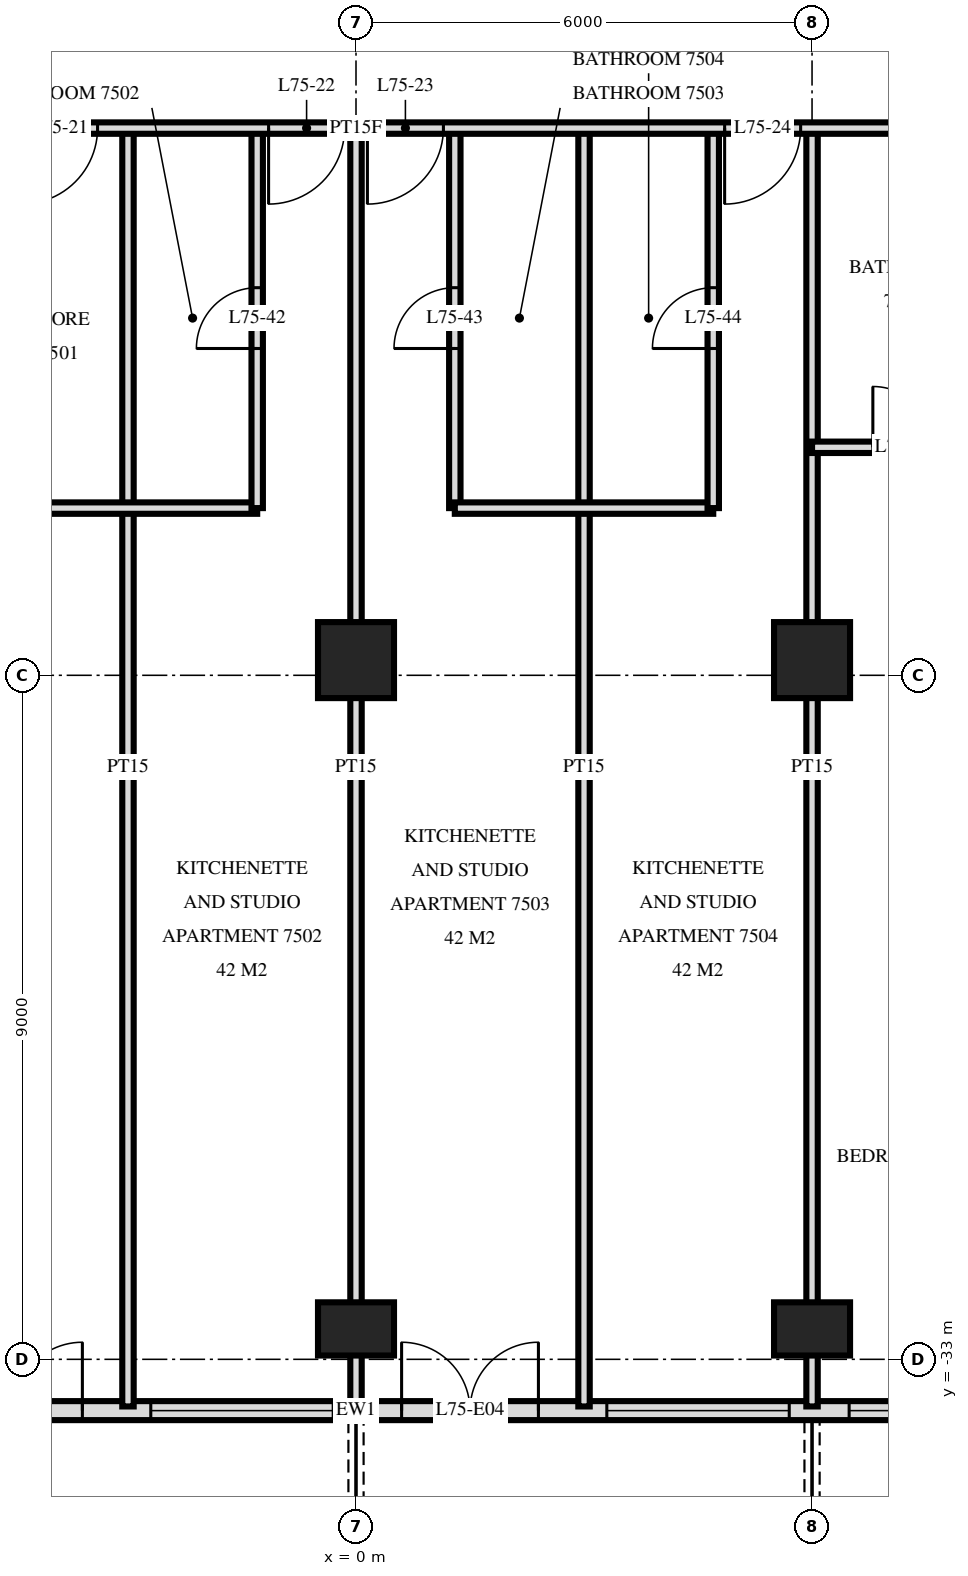
"""IFC4 building model, lengths in metres.
Left out: names, types, materials, properties, quantities, classifications, styles, units other than length and angle.
Written with IfcOpenShell. Run it as: python <this file> out.ifc"""

import sys

from ifc_helpers import new_model, si_unit, direction, frame, frame_2d, origin, origin_2d, place, context, subcontext, project, spatial, rectangle, extrude, element, fill, save


model = new_model("IFC4")
c1 = context("Model", 3, precision=1e-05, world=origin(), true_north=direction((0.0, 1.0)))
c2 = subcontext(c1, "Body", "Model", "MODEL_VIEW")
j1 = project(units=[si_unit("LENGTHUNIT", "METRE"), si_unit("PLANEANGLEUNIT", "RADIAN")], contexts=[c1])
p1 = place(None, origin())
s1 = spatial("IfcSite", under=j1, at=p1, CompositionType="ELEMENT")
p2 = place(p1, origin())
s2 = spatial("IfcBuilding", under=s1, at=p2, CompositionType="ELEMENT")
p3 = place(p2, frame((0.0, 0.0, 284.1)))
s3 = spatial("IfcBuildingStorey", under=s2, at=p3, CompositionType="ELEMENT", Elevation=284.1)
p4 = place(p3, frame((0.0, -32.6, 0.0), z_axis=(0.0, 0.0, 1.0), x_axis=(1.0, 0.0, 0.0)))
e1 = element("IfcColumn", 1, at=p4, inside=s3, PredefinedType="COLUMN", context=c2, shape_type="SweptSolid", body=[
    extrude(rectangle(XDim=1.0, YDim=0.7, at=origin_2d()), origin(), (0.0, 0.0, 1.0), 3.5),
])
p5 = place(p3, frame((0.0, -23.8, 0.0), z_axis=(0.0, 0.0, 1.0), x_axis=(1.0, 0.0, 0.0)))
e2 = element("IfcColumn", 2, at=p5, inside=s3, PredefinedType="COLUMN", context=c2, shape_type="SweptSolid", body=[
    extrude(rectangle(XDim=1.0, YDim=1.0, at=origin_2d()), origin(), (0.0, 0.0, 1.0), 3.5),
])
p6 = place(p3, frame((6.0, -32.6, 0.0), z_axis=(0.0, 0.0, 1.0), x_axis=(1.0, 0.0, 0.0)))
e3 = element("IfcColumn", 3, at=p6, inside=s3, PredefinedType="COLUMN", context=c2, shape_type="SweptSolid", body=[
    extrude(rectangle(XDim=1.0, YDim=0.7, at=origin_2d()), origin(), (0.0, 0.0, 1.0), 3.5),
])
p7 = place(p3, frame((6.0, -23.8, 0.0), z_axis=(0.0, 0.0, 1.0), x_axis=(1.0, 0.0, 0.0)))
e4 = element("IfcColumn", 4, at=p7, inside=s3, PredefinedType="COLUMN", context=c2, shape_type="SweptSolid", body=[
    extrude(rectangle(XDim=1.0, YDim=1.0, at=origin_2d()), origin(), (0.0, 0.0, 1.0), 3.5),
])
p8 = place(p3, frame((-18.575, -33.675, 0.0), z_axis=(0.0, 0.0, 1.0), x_axis=(1.0, 0.0, 0.0)))
e5 = element("IfcWall", 5, at=p8, inside=s3, PredefinedType="SOLIDWALL", context=c2, shape_type="SweptSolid", body=[
    extrude(rectangle(XDim=37.151, YDim=0.25, at=frame_2d((18.575, 0.0))), origin(), (0.0, 0.0, 1.0), 3.22),
])
p9 = place(p8, frame((1.175, 0.0, 0.0)))
e6 = element("IfcOpeningElement", 6, at=p9, cuts=e5, PredefinedType="OPENING", context=c2, shape_type="SweptSolid", body=[
    extrude(rectangle(XDim=1.8, YDim=2.4, at=frame_2d((0.9, 1.2))), frame((0.0, 0.135, 0.0), z_axis=(0.0, -1.0, 0.0), x_axis=(1.0, 0.0, 0.0)), (0.0, 0.0, 1.0), 0.27),
])
p10 = place(p8, frame((4.4, 0.0, 0.9)))
e7 = element("IfcOpeningElement", 7, at=p10, cuts=e5, PredefinedType="OPENING", context=c2, shape_type="SweptSolid", body=[
    extrude(rectangle(XDim=1.8, YDim=1.5, at=frame_2d((0.9, 0.75))), frame((0.0, 0.135, 0.0), z_axis=(0.0, -1.0, 0.0), x_axis=(1.0, 0.0, 0.0)), (0.0, 0.0, 1.0), 0.27),
])
p11 = place(p8, frame((6.875, 0.0, 0.9)))
e8 = element("IfcOpeningElement", 8, at=p11, cuts=e5, PredefinedType="OPENING", context=c2, shape_type="SweptSolid", body=[
    extrude(rectangle(XDim=2.4, YDim=1.5, at=frame_2d((1.2, 0.75))), frame((0.0, 0.135, 0.0), z_axis=(0.0, -1.0, 0.0), x_axis=(1.0, 0.0, 0.0)), (0.0, 0.0, 1.0), 0.27),
])
p12 = place(p8, frame((10.175, 0.0, 0.0)))
e9 = element("IfcOpeningElement", 9, at=p12, cuts=e5, PredefinedType="OPENING", context=c2, shape_type="SweptSolid", body=[
    extrude(rectangle(XDim=1.8, YDim=2.4, at=frame_2d((0.9, 1.2))), frame((0.0, 0.135, 0.0), z_axis=(0.0, -1.0, 0.0), x_axis=(1.0, 0.0, 0.0)), (0.0, 0.0, 1.0), 0.27),
])
p13 = place(p8, frame((13.175, 0.0, 0.0)))
e10 = element("IfcOpeningElement", 10, at=p13, cuts=e5, PredefinedType="OPENING", context=c2, shape_type="SweptSolid", body=[
    extrude(rectangle(XDim=1.8, YDim=2.4, at=frame_2d((0.9, 1.2))), frame((0.0, 0.135, 0.0), z_axis=(0.0, -1.0, 0.0), x_axis=(1.0, 0.0, 0.0)), (0.0, 0.0, 1.0), 0.27),
])
p14 = place(p8, frame((15.875, 0.0, 0.9)))
e11 = element("IfcOpeningElement", 11, at=p14, cuts=e5, PredefinedType="OPENING", context=c2, shape_type="SweptSolid", body=[
    extrude(rectangle(XDim=2.4, YDim=1.5, at=frame_2d((1.2, 0.75))), frame((0.0, 0.135, 0.0), z_axis=(0.0, -1.0, 0.0), x_axis=(1.0, 0.0, 0.0)), (0.0, 0.0, 1.0), 0.27),
])
p15 = place(p8, frame((19.175, 0.0, 0.0)))
e12 = element("IfcOpeningElement", 12, at=p15, cuts=e5, PredefinedType="OPENING", context=c2, shape_type="SweptSolid", body=[
    extrude(rectangle(XDim=1.8, YDim=2.4, at=frame_2d((0.9, 1.2))), frame((0.0, 0.135, 0.0), z_axis=(0.0, -1.0, 0.0), x_axis=(1.0, 0.0, 0.0)), (0.0, 0.0, 1.0), 0.27),
])
p16 = place(p8, frame((21.875, 0.0, 0.9)))
e13 = element("IfcOpeningElement", 13, at=p16, cuts=e5, PredefinedType="OPENING", context=c2, shape_type="SweptSolid", body=[
    extrude(rectangle(XDim=2.4, YDim=1.5, at=frame_2d((1.2, 0.75))), frame((0.0, 0.135, 0.0), z_axis=(0.0, -1.0, 0.0), x_axis=(1.0, 0.0, 0.0)), (0.0, 0.0, 1.0), 0.27),
])
p17 = place(p8, frame((25.063, 0.0, 0.9)))
e14 = element("IfcOpeningElement", 14, at=p17, cuts=e5, PredefinedType="OPENING", context=c2, shape_type="SweptSolid", body=[
    extrude(rectangle(XDim=1.8, YDim=1.5, at=frame_2d((0.9, 0.75))), frame((0.0, 0.135, 0.0), z_axis=(0.0, -1.0, 0.0), x_axis=(1.0, 0.0, 0.0)), (0.0, 0.0, 1.0), 0.27),
])
p18 = place(p8, frame((27.838, 0.0, 0.0)))
e15 = element("IfcOpeningElement", 15, at=p18, cuts=e5, PredefinedType="OPENING", context=c2, shape_type="SweptSolid", body=[
    extrude(rectangle(XDim=1.8, YDim=2.4, at=frame_2d((0.9, 1.2))), frame((0.0, 0.135, 0.0), z_axis=(0.0, -1.0, 0.0), x_axis=(1.0, 0.0, 0.0)), (0.0, 0.0, 1.0), 0.27),
])
p19 = place(p8, frame((31.175, 0.0, 0.0)))
e16 = element("IfcOpeningElement", 16, at=p19, cuts=e5, PredefinedType="OPENING", context=c2, shape_type="SweptSolid", body=[
    extrude(rectangle(XDim=1.8, YDim=2.4, at=frame_2d((0.9, 1.2))), frame((0.0, 0.135, 0.0), z_axis=(0.0, -1.0, 0.0), x_axis=(1.0, 0.0, 0.0)), (0.0, 0.0, 1.0), 0.27),
])
p20 = place(p3, frame((6.0, -33.62, 0.0), z_axis=(0.0, 0.0, 1.0), x_axis=(0.0, 1.0, 0.0)))
e17 = element("IfcWall", 17, at=p20, inside=s3, PredefinedType="PARTITIONING", context=c2, shape_type="SweptSolid", body=[
    extrude(rectangle(XDim=16.82, YDim=0.15, at=frame_2d((8.41, 0.0))), origin(), (0.0, 0.0, 1.0), 3.22),
])
p21 = place(p3, frame((4.7, -21.8, 0.0), z_axis=(0.0, 0.0, 1.0), x_axis=(0.0, 1.0, 0.0)))
e18 = element("IfcWall", 18, at=p21, inside=s3, PredefinedType="PARTITIONING", context=c2, shape_type="SweptSolid", body=[
    extrude(rectangle(XDim=5.0, YDim=0.15, at=frame_2d((2.5, 0.0))), origin(), (0.0, 0.0, 1.0), 3.22),
])
p22 = place(p21, frame((2.1, 0.0, 0.0)))
e19 = element("IfcOpeningElement", 19, at=p22, cuts=e18, PredefinedType="OPENING", context=c2, shape_type="SweptSolid", body=[
    extrude(rectangle(XDim=0.8, YDim=2.1, at=frame_2d((0.4, 1.05))), frame((0.0, 0.085, 0.0), z_axis=(0.0, -1.0, 0.0), x_axis=(1.0, 0.0, 0.0)), (0.0, 0.0, 1.0), 0.17),
])
p23 = place(p3, frame((3.0, -33.62, 0.0), z_axis=(0.0, 0.0, 1.0), x_axis=(0.0, 1.0, 0.0)))
e20 = element("IfcWall", 20, at=p23, inside=s3, PredefinedType="PARTITIONING", context=c2, shape_type="SweptSolid", body=[
    extrude(rectangle(XDim=16.82, YDim=0.15, at=frame_2d((8.41, 0.0))), origin(), (0.0, 0.0, 1.0), 3.22),
])
p24 = place(p3, frame((1.3, -21.8, 0.0), z_axis=(0.0, 0.0, 1.0), x_axis=(0.0, 1.0, 0.0)))
e21 = element("IfcWall", 21, at=p24, inside=s3, PredefinedType="PARTITIONING", context=c2, shape_type="SweptSolid", body=[
    extrude(rectangle(XDim=5.0, YDim=0.15, at=frame_2d((2.5, 0.0))), origin(), (0.0, 0.0, 1.0), 3.22),
])
p25 = place(p24, frame((2.1, 0.0, 0.0)))
e22 = element("IfcOpeningElement", 22, at=p25, cuts=e21, PredefinedType="OPENING", context=c2, shape_type="SweptSolid", body=[
    extrude(rectangle(XDim=0.8, YDim=2.1, at=frame_2d((0.4, 1.05))), frame((0.0, 0.085, 0.0), z_axis=(0.0, -1.0, 0.0), x_axis=(1.0, 0.0, 0.0)), (0.0, 0.0, 1.0), 0.17),
])
p26 = place(p3, frame((0.0, -33.62, 0.0), z_axis=(0.0, 0.0, 1.0), x_axis=(0.0, 1.0, 0.0)))
e23 = element("IfcWall", 23, at=p26, inside=s3, PredefinedType="PARTITIONING", context=c2, shape_type="SweptSolid", body=[
    extrude(rectangle(XDim=16.82, YDim=0.15, at=frame_2d((8.41, 0.0))), origin(), (0.0, 0.0, 1.0), 3.22),
])
p27 = place(p3, frame((-1.3, -21.8, 0.0), z_axis=(0.0, 0.0, 1.0), x_axis=(0.0, 1.0, 0.0)))
e24 = element("IfcWall", 24, at=p27, inside=s3, PredefinedType="PARTITIONING", context=c2, shape_type="SweptSolid", body=[
    extrude(rectangle(XDim=5.0, YDim=0.15, at=frame_2d((2.5, 0.0))), origin(), (0.0, 0.0, 1.0), 3.22),
])
p28 = place(p27, frame((2.1, 0.0, 0.0)))
e25 = element("IfcOpeningElement", 25, at=p28, cuts=e24, PredefinedType="OPENING", context=c2, shape_type="SweptSolid", body=[
    extrude(rectangle(XDim=0.8, YDim=2.1, at=frame_2d((0.4, 1.05))), frame((0.0, 0.085, 0.0), z_axis=(0.0, -1.0, 0.0), x_axis=(1.0, 0.0, 0.0)), (0.0, 0.0, 1.0), 0.17),
])
p29 = place(p3, frame((-3.0, -33.62, 0.0), z_axis=(0.0, 0.0, 1.0), x_axis=(0.0, 1.0, 0.0)))
e26 = element("IfcWall", 26, at=p29, inside=s3, PredefinedType="PARTITIONING", context=c2, shape_type="SweptSolid", body=[
    extrude(rectangle(XDim=16.82, YDim=0.15, at=frame_2d((8.41, 0.0))), origin(), (0.0, 0.0, 1.0), 3.22),
])
p30 = place(p3, frame((-4.8, -21.8, 0.0), z_axis=(0.0, 0.0, 1.0), x_axis=(1.0, 0.0, 0.0)))
e27 = element("IfcWall", 27, at=p30, inside=s3, PredefinedType="PARTITIONING", context=c2, shape_type="SweptSolid", body=[
    extrude(rectangle(XDim=3.5, YDim=0.15, at=frame_2d((1.75, 0.0))), origin(), (0.0, 0.0, 1.0), 3.22),
])
p31 = place(p3, frame((1.3, -21.8, 0.0), z_axis=(0.0, 0.0, 1.0), x_axis=(1.0, 0.0, 0.0)))
e28 = element("IfcWall", 28, at=p31, inside=s3, PredefinedType="PARTITIONING", context=c2, shape_type="SweptSolid", body=[
    extrude(rectangle(XDim=3.4, YDim=0.15, at=frame_2d((1.7, 0.0))), origin(), (0.0, 0.0, 1.0), 3.22),
])
p32 = place(p3, frame((6.0, -21.0, 0.0), z_axis=(0.0, 0.0, 1.0), x_axis=(1.0, 0.0, 0.0)))
e29 = element("IfcWall", 29, at=p32, inside=s3, PredefinedType="PARTITIONING", context=c2, shape_type="SweptSolid", body=[
    extrude(rectangle(XDim=6.0, YDim=0.15, at=frame_2d((3.0, 0.0))), origin(), (0.0, 0.0, 1.0), 3.22),
])
p33 = place(p32, frame((0.8, 0.0, 0.0)))
e30 = element("IfcOpeningElement", 30, at=p33, cuts=e29, PredefinedType="OPENING", context=c2, shape_type="SweptSolid", body=[
    extrude(rectangle(XDim=0.8, YDim=2.1, at=frame_2d((0.4, 1.05))), frame((0.0, 0.085, 0.0), z_axis=(0.0, -1.0, 0.0), x_axis=(1.0, 0.0, 0.0)), (0.0, 0.0, 1.0), 0.17),
])
p34 = place(p3, frame((-22.92, -16.8, 0.0), z_axis=(0.0, 0.0, 1.0), x_axis=(1.0, 0.0, 0.0)))
e31 = element("IfcWall", 31, at=p34, inside=s3, PredefinedType="PARTITIONING", context=c2, shape_type="SweptSolid", body=[
    extrude(rectangle(XDim=45.84, YDim=0.15, at=frame_2d((22.92, 0.0))), origin(), (0.0, 0.0, 1.0), 3.22),
])
p35 = place(p34, frame((16.72, 0.0, 0.0)))
e32 = element("IfcOpeningElement", 32, at=p35, cuts=e31, PredefinedType="OPENING", context=c2, shape_type="SweptSolid", body=[
    extrude(rectangle(XDim=1.0, YDim=2.1, at=frame_2d((0.5, 1.05))), frame((0.0, 0.085, 0.0), z_axis=(0.0, -1.0, 0.0), x_axis=(1.0, 0.0, 0.0)), (0.0, 0.0, 1.0), 0.17),
])
p36 = place(p34, frame((18.52, 0.0, 0.0)))
e33 = element("IfcOpeningElement", 33, at=p36, cuts=e31, PredefinedType="OPENING", context=c2, shape_type="SweptSolid", body=[
    extrude(rectangle(XDim=1.0, YDim=2.1, at=frame_2d((0.5, 1.05))), frame((0.0, 0.085, 0.0), z_axis=(0.0, -1.0, 0.0), x_axis=(1.0, 0.0, 0.0)), (0.0, 0.0, 1.0), 0.17),
])
p37 = place(p34, frame((21.77, 0.0, 0.0)))
e34 = element("IfcOpeningElement", 34, at=p37, cuts=e31, PredefinedType="OPENING", context=c2, shape_type="SweptSolid", body=[
    extrude(rectangle(XDim=1.0, YDim=2.1, at=frame_2d((0.5, 1.05))), frame((0.0, 0.085, 0.0), z_axis=(0.0, -1.0, 0.0), x_axis=(1.0, 0.0, 0.0)), (0.0, 0.0, 1.0), 0.17),
])
p38 = place(p34, frame((23.07, 0.0, 0.0)))
e35 = element("IfcOpeningElement", 35, at=p38, cuts=e31, PredefinedType="OPENING", context=c2, shape_type="SweptSolid", body=[
    extrude(rectangle(XDim=1.0, YDim=2.1, at=frame_2d((0.5, 1.05))), frame((0.0, 0.085, 0.0), z_axis=(0.0, -1.0, 0.0), x_axis=(1.0, 0.0, 0.0)), (0.0, 0.0, 1.0), 0.17),
])
p39 = place(p34, frame((27.77, 0.0, 0.0)))
e36 = element("IfcOpeningElement", 36, at=p39, cuts=e31, PredefinedType="OPENING", context=c2, shape_type="SweptSolid", body=[
    extrude(rectangle(XDim=1.0, YDim=2.1, at=frame_2d((0.5, 1.05))), frame((0.0, 0.085, 0.0), z_axis=(0.0, -1.0, 0.0), x_axis=(1.0, 0.0, 0.0)), (0.0, 0.0, 1.0), 0.17),
])
p40 = place(p34, frame((7.02, 0.0, 0.0)))
e37 = element("IfcOpeningElement", 37, at=p40, cuts=e31, PredefinedType="OPENING", context=c2, shape_type="SweptSolid", body=[
    extrude(rectangle(XDim=1.0, YDim=2.1, at=frame_2d((0.5, 1.05))), frame((0.0, 0.085, 0.0), z_axis=(0.0, -1.0, 0.0), x_axis=(1.0, 0.0, 0.0)), (0.0, 0.0, 1.0), 0.17),
])
p41 = place(p34, frame((35.42, 0.0, 0.0)))
e38 = element("IfcOpeningElement", 38, at=p41, cuts=e31, PredefinedType="OPENING", context=c2, shape_type="SweptSolid", body=[
    extrude(rectangle(XDim=1.0, YDim=2.1, at=frame_2d((0.5, 1.05))), frame((0.0, 0.085, 0.0), z_axis=(0.0, -1.0, 0.0), x_axis=(1.0, 0.0, 0.0)), (0.0, 0.0, 1.0), 0.17),
])
p42 = place(p34, frame((42.19, 0.0, 0.0)))
e39 = element("IfcOpeningElement", 39, at=p42, cuts=e31, PredefinedType="OPENING", context=c2, shape_type="SweptSolid", body=[
    extrude(rectangle(XDim=1.0, YDim=2.1, at=frame_2d((0.5, 1.05))), frame((0.0, 0.085, 0.0), z_axis=(0.0, -1.0, 0.0), x_axis=(1.0, 0.0, 0.0)), (0.0, 0.0, 1.0), 0.17),
])
p43 = place(p13, origin())
e40 = element("IfcDoor", 40, at=p43, inside=s3, OperationType="DOUBLE_DOOR_SINGLE_SWING", PredefinedType="DOOR", context=c2, shape_type="SweptSolid", body=[
    extrude(rectangle(XDim=1.8, YDim=2.4, at=frame_2d((0.9, 1.2))), frame((0.0, 0.025, 0.0), z_axis=(0.0, -1.0, 0.0), x_axis=(1.0, 0.0, 0.0)), (0.0, 0.0, 1.0), 0.05),
])
fill(e10, e40)
p44 = place(p14, origin())
e41 = element("IfcWindow", 41, at=p44, inside=s3, PartitioningType="SINGLE_PANEL", PredefinedType="WINDOW", context=c2, shape_type="SweptSolid", body=[
    extrude(rectangle(XDim=2.4, YDim=1.5, at=frame_2d((1.2, 0.75))), frame((0.0, 0.03, 0.0), z_axis=(0.0, -1.0, 0.0), x_axis=(1.0, 0.0, 0.0)), (0.0, 0.0, 1.0), 0.06),
])
fill(e11, e41)
p45 = place(p15, origin())
e42 = element("IfcDoor", 42, at=p45, inside=s3, OperationType="DOUBLE_DOOR_SINGLE_SWING", PredefinedType="DOOR", context=c2, shape_type="SweptSolid", body=[
    extrude(rectangle(XDim=1.8, YDim=2.4, at=frame_2d((0.9, 1.2))), frame((0.0, 0.025, 0.0), z_axis=(0.0, -1.0, 0.0), x_axis=(1.0, 0.0, 0.0)), (0.0, 0.0, 1.0), 0.05),
])
fill(e12, e42)
p46 = place(p16, origin())
e43 = element("IfcWindow", 43, at=p46, inside=s3, PartitioningType="SINGLE_PANEL", PredefinedType="WINDOW", context=c2, shape_type="SweptSolid", body=[
    extrude(rectangle(XDim=2.4, YDim=1.5, at=frame_2d((1.2, 0.75))), frame((0.0, 0.03, 0.0), z_axis=(0.0, -1.0, 0.0), x_axis=(1.0, 0.0, 0.0)), (0.0, 0.0, 1.0), 0.06),
])
fill(e13, e43)
p47 = place(p17, origin())
e44 = element("IfcWindow", 44, at=p47, inside=s3, PartitioningType="SINGLE_PANEL", PredefinedType="WINDOW", context=c2, shape_type="SweptSolid", body=[
    extrude(rectangle(XDim=1.8, YDim=1.5, at=frame_2d((0.9, 0.75))), frame((0.0, 0.03, 0.0), z_axis=(0.0, -1.0, 0.0), x_axis=(1.0, 0.0, 0.0)), (0.0, 0.0, 1.0), 0.06),
])
fill(e14, e44)
p48 = place(p36, frame((0.5, 0.0, 0.0), z_axis=(0.0, 0.0, 1.0), x_axis=(-1.0, 0.0, 0.0)))
e45 = element("IfcDoor", 45, at=p48, inside=s3, OperationType="SINGLE_SWING_LEFT", PredefinedType="DOOR", context=c2, shape_type="SweptSolid", body=[
    extrude(rectangle(XDim=1.0, YDim=2.1, at=frame_2d((0.0, 1.05))), frame((0.0, -0.025, 0.0), z_axis=(0.0, 1.0, 0.0), x_axis=(-1.0, 0.0, 0.0)), (0.0, 0.0, 1.0), 0.05),
])
fill(e33, e45)
p49 = place(p37, frame((0.5, 0.0, 0.0), z_axis=(0.0, 0.0, 1.0), x_axis=(-1.0, 0.0, 0.0)))
e46 = element("IfcDoor", 46, at=p49, inside=s3, OperationType="SINGLE_SWING_LEFT", PredefinedType="DOOR", context=c2, shape_type="SweptSolid", body=[
    extrude(rectangle(XDim=1.0, YDim=2.1, at=frame_2d((0.0, 1.05))), frame((0.0, -0.025, 0.0), z_axis=(0.0, 1.0, 0.0), x_axis=(-1.0, 0.0, 0.0)), (0.0, 0.0, 1.0), 0.05),
])
fill(e34, e46)
p50 = place(p38, frame((0.5, 0.0, 0.0), z_axis=(0.0, 0.0, 1.0), x_axis=(-1.0, 0.0, 0.0)))
e47 = element("IfcDoor", 47, at=p50, inside=s3, OperationType="SINGLE_SWING_LEFT", PredefinedType="DOOR", context=c2, shape_type="SweptSolid", body=[
    extrude(rectangle(XDim=1.0, YDim=2.1, at=frame_2d((0.0, 1.05))), frame((0.0, -0.025, 0.0), z_axis=(0.0, 1.0, 0.0), x_axis=(-1.0, 0.0, 0.0)), (0.0, 0.0, 1.0), 0.05),
])
fill(e35, e47)
p51 = place(p39, frame((0.5, 0.0, 0.0), z_axis=(0.0, 0.0, 1.0), x_axis=(-1.0, 0.0, 0.0)))
e48 = element("IfcDoor", 48, at=p51, inside=s3, OperationType="SINGLE_SWING_LEFT", PredefinedType="DOOR", context=c2, shape_type="SweptSolid", body=[
    extrude(rectangle(XDim=1.0, YDim=2.1, at=frame_2d((0.0, 1.05))), frame((0.0, -0.025, 0.0), z_axis=(0.0, 1.0, 0.0), x_axis=(-1.0, 0.0, 0.0)), (0.0, 0.0, 1.0), 0.05),
])
fill(e36, e48)
p52 = place(p28, origin())
e49 = element("IfcDoor", 49, at=p52, inside=s3, OperationType="SINGLE_SWING_RIGHT", PredefinedType="DOOR", context=c2, shape_type="SweptSolid", body=[
    extrude(rectangle(XDim=0.8, YDim=2.1, at=frame_2d((0.4, 1.05))), frame((0.0, 0.025, 0.0), z_axis=(0.0, -1.0, 0.0), x_axis=(1.0, 0.0, 0.0)), (0.0, 0.0, 1.0), 0.05),
])
fill(e25, e49)
p53 = place(p25, origin())
e50 = element("IfcDoor", 50, at=p53, inside=s3, OperationType="SINGLE_SWING_RIGHT", PredefinedType="DOOR", context=c2, shape_type="SweptSolid", body=[
    extrude(rectangle(XDim=0.8, YDim=2.1, at=frame_2d((0.4, 1.05))), frame((0.0, 0.025, 0.0), z_axis=(0.0, -1.0, 0.0), x_axis=(1.0, 0.0, 0.0)), (0.0, 0.0, 1.0), 0.05),
])
fill(e22, e50)
p54 = place(p22, origin())
e51 = element("IfcDoor", 51, at=p54, inside=s3, OperationType="SINGLE_SWING_RIGHT", PredefinedType="DOOR", context=c2, shape_type="SweptSolid", body=[
    extrude(rectangle(XDim=0.8, YDim=2.1, at=frame_2d((0.4, 1.05))), frame((0.0, 0.025, 0.0), z_axis=(0.0, -1.0, 0.0), x_axis=(1.0, 0.0, 0.0)), (0.0, 0.0, 1.0), 0.05),
])
fill(e19, e51)
p55 = place(p33, origin())
e52 = element("IfcDoor", 52, at=p55, inside=s3, OperationType="SINGLE_SWING_RIGHT", PredefinedType="DOOR", context=c2, shape_type="SweptSolid", body=[
    extrude(rectangle(XDim=0.8, YDim=2.1, at=frame_2d((0.4, 1.05))), frame((0.0, 0.025, 0.0), z_axis=(0.0, -1.0, 0.0), x_axis=(1.0, 0.0, 0.0)), (0.0, 0.0, 1.0), 0.05),
])
fill(e30, e52)
save(model, sys.argv[1])
